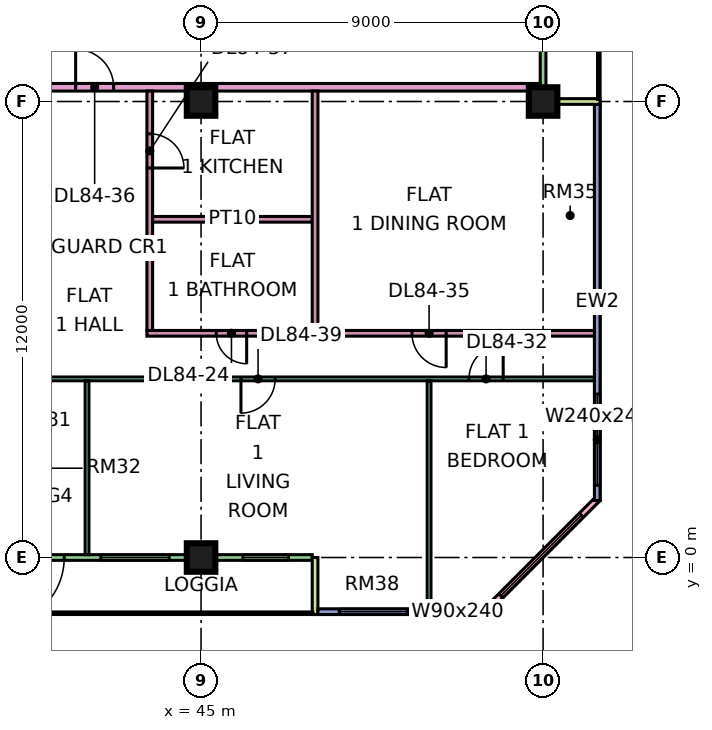
"""IFC4 building model, lengths in metres.
Left out: names, types, materials, properties, quantities, classifications, styles, units other than length and angle.
Written with IfcOpenShell. Run it as: python <this file> out.ifc"""

import sys

from ifc_helpers import new_model, si_unit, direction, frame, frame_2d, origin, origin_2d, place, context, subcontext, project, spatial, rectangle, extrude, element, fill, save


model = new_model("IFC4")
c1 = context("Model", 3, precision=1e-05, world=origin(), true_north=direction((0.0, 1.0)))
c2 = subcontext(c1, "Body", "Model", "MODEL_VIEW")
j1 = project(units=[si_unit("LENGTHUNIT", "METRE"), si_unit("PLANEANGLEUNIT", "RADIAN")], contexts=[c1])
p1 = place(None, origin())
s1 = spatial("IfcSite", under=j1, at=p1, CompositionType="ELEMENT")
p2 = place(p1, origin())
s2 = spatial("IfcBuilding", under=s1, at=p2, CompositionType="ELEMENT")
p3 = place(p2, frame((0.0, 0.0, 361.4)))
s3 = spatial("IfcBuildingStorey", under=s2, at=p3, CompositionType="ELEMENT", Elevation=361.4)
for number, where, z_axis, x_axis in (
    (1, (45.0, 0.0, 0.0), (0.0, 0.0, 1.0), (1.0, 0.0, 0.0)),
    (2, (45.0, 12.0, 0.0), (0.0, 0.0, 1.0), (1.0, 0.0, 0.0)),
    (3, (54.0, 12.0, 0.0), (0.0, 0.0, 1.0), (1.0, 0.0, 0.0)),
):
    element("IfcColumn", number, at=place(p3, frame(where, z_axis=z_axis, x_axis=x_axis)), inside=s3, PredefinedType="COLUMN", context=c2, shape_type="SweptSolid", body=[
        extrude(rectangle(XDim=0.75, YDim=0.75, at=origin_2d()), origin(), (0.0, 0.0, 1.0), 3.75),
    ])
p4 = place(p3, frame((36.075, 0.0, 0.0), z_axis=(0.0, 0.0, 1.0), x_axis=(1.0, 0.0, 0.0)))
e4 = element("IfcWall", 4, at=p4, inside=s3, PredefinedType="SOLIDWALL", context=c2, shape_type="SweptSolid", body=[
    extrude(rectangle(XDim=11.85, YDim=0.15, at=frame_2d((5.925, 0.0))), origin(), (0.0, 0.0, 1.0), 3.35),
])
p5 = place(p4, frame((0.762, 0.0, 0.45)))
e5 = element("IfcOpeningElement", 5, at=p5, cuts=e4, PredefinedType="OPENING", context=c2, shape_type="SweptSolid", body=[
    extrude(rectangle(XDim=1.8, YDim=2.4, at=frame_2d((0.9, 1.2))), frame((0.0, 0.085, 0.0), z_axis=(0.0, -1.0, 0.0), x_axis=(1.0, 0.0, 0.0)), (0.0, 0.0, 1.0), 0.17),
])
p6 = place(p4, frame((3.525, 0.0, 0.0)))
e6 = element("IfcOpeningElement", 6, at=p6, cuts=e4, PredefinedType="OPENING", context=c2, shape_type="SweptSolid", body=[
    extrude(rectangle(XDim=1.8, YDim=2.4, at=frame_2d((0.9, 1.2))), frame((0.0, 0.085, 0.0), z_axis=(0.0, -1.0, 0.0), x_axis=(1.0, 0.0, 0.0)), (0.0, 0.0, 1.0), 0.17),
])
p7 = place(p4, frame((6.288, 0.0, 0.45)))
e7 = element("IfcOpeningElement", 7, at=p7, cuts=e4, PredefinedType="OPENING", context=c2, shape_type="SweptSolid", body=[
    extrude(rectangle(XDim=1.8, YDim=2.4, at=frame_2d((0.9, 1.2))), frame((0.0, 0.085, 0.0), z_axis=(0.0, -1.0, 0.0), x_axis=(1.0, 0.0, 0.0)), (0.0, 0.0, 1.0), 0.17),
])
p8 = place(p4, frame((10.025, 0.0, 0.45)))
e8 = element("IfcOpeningElement", 8, at=p8, cuts=e4, PredefinedType="OPENING", context=c2, shape_type="SweptSolid", body=[
    extrude(rectangle(XDim=1.2, YDim=2.4, at=frame_2d((0.6, 1.2))), frame((0.0, 0.085, 0.0), z_axis=(0.0, -1.0, 0.0), x_axis=(1.0, 0.0, 0.0)), (0.0, 0.0, 1.0), 0.17),
])
p9 = place(p3, frame((48.0, -1.5, 0.0), z_axis=(0.0, 0.0, 1.0), x_axis=(0.0, 1.0, 0.0)))
e9 = element("IfcWall", 9, at=p9, inside=s3, PredefinedType="SOLIDWALL", context=c2, shape_type="SweptSolid", body=[
    extrude(rectangle(XDim=1.5, YDim=0.15, at=frame_2d((0.75, 0.0))), origin(), (0.0, 0.0, 1.0), 3.35),
])
p10 = place(p3, frame((48.075, -1.425, 0.0), z_axis=(0.0, 0.0, 1.0), x_axis=(1.0, 0.0, 0.0)))
e10 = element("IfcWall", 10, at=p10, inside=s3, PredefinedType="SOLIDWALL", context=c2, shape_type="SweptSolid", body=[
    extrude(rectangle(XDim=4.425, YDim=0.15, at=frame_2d((2.212, 0.0))), origin(), (0.0, 0.0, 1.0), 3.35),
])
p11 = place(p10, frame((0.562, 0.0, 0.45)))
e11 = element("IfcOpeningElement", 11, at=p11, cuts=e10, PredefinedType="OPENING", context=c2, shape_type="SweptSolid", body=[
    extrude(rectangle(XDim=1.8, YDim=2.4, at=frame_2d((0.9, 1.2))), frame((0.0, 0.085, 0.0), z_axis=(0.0, -1.0, 0.0), x_axis=(1.0, 0.0, 0.0)), (0.0, 0.0, 1.0), 0.17),
])
p12 = place(p10, frame((3.225, 0.0, 0.45)))
e12 = element("IfcOpeningElement", 12, at=p12, cuts=e10, PredefinedType="OPENING", context=c2, shape_type="SweptSolid", body=[
    extrude(rectangle(XDim=0.9, YDim=2.4, at=frame_2d((0.45, 1.2))), frame((0.0, 0.085, 0.0), z_axis=(0.0, -1.0, 0.0), x_axis=(1.0, 0.0, 0.0)), (0.0, 0.0, 1.0), 0.17),
])
p13 = place(p3, frame((52.447, -1.447, 0.0), z_axis=(0.0, 0.0, 1.0), x_axis=(0.707106781187, 0.707106781187, 0.0)))
e13 = element("IfcWall", 13, at=p13, inside=s3, PredefinedType="SOLIDWALL", context=c2, shape_type="SweptSolid", body=[
    extrude(rectangle(XDim=4.243, YDim=0.15, at=frame_2d((2.121, 0.0))), origin(), (0.0, 0.0, 1.0), 3.35),
])
p14 = place(p13, frame((0.621, 0.0, 0.45)))
e14 = element("IfcOpeningElement", 14, at=p14, cuts=e13, PredefinedType="OPENING", context=c2, shape_type="SweptSolid", body=[
    extrude(rectangle(XDim=3.0, YDim=2.4, at=frame_2d((1.5, 1.2))), frame((0.0, 0.085, 0.0), z_axis=(0.0, -1.0, 0.0), x_axis=(1.0, 0.0, 0.0)), (0.0, 0.0, 1.0), 0.17),
])
p15 = place(p3, frame((55.425, 1.5, 0.0), z_axis=(0.0, 0.0, 1.0), x_axis=(0.0, 1.0, 0.0)))
e15 = element("IfcWall", 15, at=p15, inside=s3, PredefinedType="SOLIDWALL", context=c2, shape_type="SweptSolid", body=[
    extrude(rectangle(XDim=10.425, YDim=0.15, at=frame_2d((5.212, 0.0))), origin(), (0.0, 0.0, 1.0), 3.35),
])
p16 = place(p15, frame((0.4, 0.0, 0.45)))
e16 = element("IfcOpeningElement", 16, at=p16, cuts=e15, PredefinedType="OPENING", context=c2, shape_type="SweptSolid", body=[
    extrude(rectangle(XDim=2.4, YDim=2.4, at=frame_2d((1.2, 1.2))), frame((0.0, 0.085, 0.0), z_axis=(0.0, -1.0, 0.0), x_axis=(1.0, 0.0, 0.0)), (0.0, 0.0, 1.0), 0.17),
])
p17 = place(p3, frame((54.0, 12.075, 0.0), z_axis=(0.0, 0.0, 1.0), x_axis=(0.0, 1.0, 0.0)))
e17 = element("IfcWall", 17, at=p17, inside=s3, PredefinedType="SOLIDWALL", context=c2, shape_type="SweptSolid", body=[
    extrude(rectangle(XDim=10.35, YDim=0.15, at=frame_2d((5.175, 0.0))), origin(), (0.0, 0.0, 1.0), 3.35),
])
p18 = place(p17, frame((4.538, 0.0, 0.45)))
e18 = element("IfcOpeningElement", 18, at=p18, cuts=e17, PredefinedType="OPENING", context=c2, shape_type="SweptSolid", body=[
    extrude(rectangle(XDim=4.8, YDim=2.4, at=frame_2d((2.4, 1.2))), frame((0.0, 0.085, 0.0), z_axis=(0.0, -1.0, 0.0), x_axis=(1.0, 0.0, 0.0)), (0.0, 0.0, 1.0), 0.17),
])
p19 = place(p3, frame((55.5, 12.0, 0.0), z_axis=(0.0, 0.0, 1.0), x_axis=(-1.0, 0.0, 0.0)))
e19 = element("IfcWall", 19, at=p19, inside=s3, PredefinedType="SOLIDWALL", context=c2, shape_type="SweptSolid", body=[
    extrude(rectangle(XDim=1.5, YDim=0.15, at=frame_2d((0.75, 0.0))), origin(), (0.0, 0.0, 1.0), 3.35),
])
p20 = place(p3, frame((33.05, 4.7, 0.0), z_axis=(0.0, 0.0, 1.0), x_axis=(1.0, 0.0, 0.0)))
e20 = element("IfcWall", 20, at=p20, inside=s3, PredefinedType="PARTITIONING", context=c2, shape_type="SweptSolid", body=[
    extrude(rectangle(XDim=22.301, YDim=0.1, at=frame_2d((11.15, 0.0))), origin(), (0.0, 0.0, 1.0), 3.35),
])
p21 = place(p20, frame((1.0, 0.0, 0.0)))
e21 = element("IfcOpeningElement", 21, at=p21, cuts=e20, PredefinedType="OPENING", context=c2, shape_type="SweptSolid", body=[
    extrude(rectangle(XDim=0.9, YDim=2.1, at=frame_2d((0.45, 1.05))), frame((0.0, 0.06, 0.0), z_axis=(0.0, -1.0, 0.0), x_axis=(1.0, 0.0, 0.0)), (0.0, 0.0, 1.0), 0.12),
])
p22 = place(p20, frame((4.0, 0.0, 0.0)))
e22 = element("IfcOpeningElement", 22, at=p22, cuts=e20, PredefinedType="OPENING", context=c2, shape_type="SweptSolid", body=[
    extrude(rectangle(XDim=0.9, YDim=2.1, at=frame_2d((0.45, 1.05))), frame((0.0, 0.06, 0.0), z_axis=(0.0, -1.0, 0.0), x_axis=(1.0, 0.0, 0.0)), (0.0, 0.0, 1.0), 0.12),
])
p23 = place(p20, frame((7.0, 0.0, 0.0)))
e23 = element("IfcOpeningElement", 23, at=p23, cuts=e20, PredefinedType="OPENING", context=c2, shape_type="SweptSolid", body=[
    extrude(rectangle(XDim=0.9, YDim=2.1, at=frame_2d((0.45, 1.05))), frame((0.0, 0.06, 0.0), z_axis=(0.0, -1.0, 0.0), x_axis=(1.0, 0.0, 0.0)), (0.0, 0.0, 1.0), 0.12),
])
p24 = place(p20, frame((19.0, 0.0, 0.0)))
e24 = element("IfcOpeningElement", 24, at=p24, cuts=e20, PredefinedType="OPENING", context=c2, shape_type="SweptSolid", body=[
    extrude(rectangle(XDim=0.9, YDim=2.1, at=frame_2d((0.45, 1.05))), frame((0.0, 0.06, 0.0), z_axis=(0.0, -1.0, 0.0), x_axis=(1.0, 0.0, 0.0)), (0.0, 0.0, 1.0), 0.12),
])
p25 = place(p20, frame((13.0, 0.0, 0.0)))
e25 = element("IfcOpeningElement", 25, at=p25, cuts=e20, PredefinedType="OPENING", context=c2, shape_type="SweptSolid", body=[
    extrude(rectangle(XDim=0.9, YDim=2.1, at=frame_2d((0.45, 1.05))), frame((0.0, 0.06, 0.0), z_axis=(0.0, -1.0, 0.0), x_axis=(1.0, 0.0, 0.0)), (0.0, 0.0, 1.0), 0.12),
])
p26 = place(p3, frame((40.65, 12.375, 0.0), z_axis=(0.0, 0.0, 1.0), x_axis=(1.0, 0.0, 0.0)))
e26 = element("IfcWall", 26, at=p26, inside=s3, PredefinedType="PARTITIONING", context=c2, shape_type="SweptSolid", body=[
    extrude(rectangle(XDim=13.276, YDim=0.2, at=frame_2d((6.638, 0.0))), origin(), (0.0, 0.0, 1.0), 3.35),
])
p27 = place(p26, frame((1.05, 0.0, 0.0)))
e27 = element("IfcOpeningElement", 27, at=p27, cuts=e26, PredefinedType="OPENING", context=c2, shape_type="SweptSolid", body=[
    extrude(rectangle(XDim=1.0, YDim=2.1, at=frame_2d((0.5, 1.05))), frame((0.0, 0.11, 0.0), z_axis=(0.0, -1.0, 0.0), x_axis=(1.0, 0.0, 0.0)), (0.0, 0.0, 1.0), 0.22),
])
p28 = place(p3, frame((42.0, 0.074, 0.0), z_axis=(0.0, 0.0, 1.0), x_axis=(0.0, 1.0, 0.0)))
e28 = element("IfcWall", 28, at=p28, inside=s3, PredefinedType="PARTITIONING", context=c2, shape_type="SweptSolid", body=[
    extrude(rectangle(XDim=4.576, YDim=0.1, at=frame_2d((2.288, 0.0))), origin(), (0.0, 0.0, 1.0), 3.35),
])
p29 = place(p3, frame((43.575, 5.9, 0.0), z_axis=(0.0, 0.0, 1.0), x_axis=(1.0, 0.0, 0.0)))
e29 = element("IfcWall", 29, at=p29, inside=s3, PredefinedType="PARTITIONING", context=c2, shape_type="SweptSolid", body=[
    extrude(rectangle(XDim=11.775, YDim=0.15, at=frame_2d((5.888, 0.0))), origin(), (0.0, 0.0, 1.0), 3.35),
])
p30 = place(p29, frame((1.825, 0.0, 0.0)))
e30 = element("IfcOpeningElement", 30, at=p30, cuts=e29, PredefinedType="OPENING", context=c2, shape_type="SweptSolid", body=[
    extrude(rectangle(XDim=0.8, YDim=2.1, at=frame_2d((0.4, 1.05))), frame((0.0, 0.085, 0.0), z_axis=(0.0, -1.0, 0.0), x_axis=(1.0, 0.0, 0.0)), (0.0, 0.0, 1.0), 0.17),
])
p31 = place(p29, frame((6.975, 0.0, 0.0)))
e31 = element("IfcOpeningElement", 31, at=p31, cuts=e29, PredefinedType="OPENING", context=c2, shape_type="SweptSolid", body=[
    extrude(rectangle(XDim=0.9, YDim=2.1, at=frame_2d((0.45, 1.05))), frame((0.0, 0.085, 0.0), z_axis=(0.0, -1.0, 0.0), x_axis=(1.0, 0.0, 0.0)), (0.0, 0.0, 1.0), 0.17),
])
p32 = place(p3, frame((43.65, 5.975, 0.0), z_axis=(0.0, 0.0, 1.0), x_axis=(0.0, 1.0, 0.0)))
e32 = element("IfcWall", 32, at=p32, inside=s3, PredefinedType="PARTITIONING", context=c2, shape_type="SweptSolid", body=[
    extrude(rectangle(XDim=6.3, YDim=0.15, at=frame_2d((3.15, 0.0))), origin(), (0.0, 0.0, 1.0), 3.35),
])
p33 = place(p32, frame((4.275, 0.0, 0.0)))
e33 = element("IfcOpeningElement", 33, at=p33, cuts=e32, PredefinedType="OPENING", context=c2, shape_type="SweptSolid", body=[
    extrude(rectangle(XDim=0.9, YDim=2.1, at=frame_2d((0.45, 1.05))), frame((0.0, 0.085, 0.0), z_axis=(0.0, -1.0, 0.0), x_axis=(1.0, 0.0, 0.0)), (0.0, 0.0, 1.0), 0.17),
])
p34 = place(p3, frame((43.725, 8.9, 0.0), z_axis=(0.0, 0.0, 1.0), x_axis=(1.0, 0.0, 0.0)))
e34 = element("IfcWall", 34, at=p34, inside=s3, PredefinedType="PARTITIONING", context=c2, shape_type="SweptSolid", body=[
    extrude(rectangle(XDim=4.2, YDim=0.15, at=frame_2d((2.1, 0.0))), origin(), (0.0, 0.0, 1.0), 3.35),
])
p35 = place(p3, frame((48.0, 5.975, 0.0), z_axis=(0.0, 0.0, 1.0), x_axis=(0.0, 1.0, 0.0)))
e35 = element("IfcWall", 35, at=p35, inside=s3, PredefinedType="PARTITIONING", context=c2, shape_type="SweptSolid", body=[
    extrude(rectangle(XDim=6.3, YDim=0.15, at=frame_2d((3.15, 0.0))), origin(), (0.0, 0.0, 1.0), 3.35),
])
p36 = place(p3, frame((51.0, -1.35, 0.0), z_axis=(0.0, 0.0, 1.0), x_axis=(0.0, 1.0, 0.0)))
e36 = element("IfcWall", 36, at=p36, inside=s3, PredefinedType="PARTITIONING", context=c2, shape_type="SweptSolid", body=[
    extrude(rectangle(XDim=6.0, YDim=0.1, at=frame_2d((3.0, 0.0))), origin(), (0.0, 0.0, 1.0), 3.35),
])
p37 = place(p6, frame((1.8, 0.0, 0.0), z_axis=(0.0, 0.0, 1.0), x_axis=(-1.0, 0.0, 0.0)))
e37 = element("IfcDoor", 37, at=p37, inside=s3, OperationType="DOUBLE_DOOR_SINGLE_SWING", PredefinedType="DOOR", context=c2, shape_type="SweptSolid", body=[
    extrude(rectangle(XDim=1.8, YDim=2.4, at=frame_2d((0.9, 1.2))), frame((0.0, 0.025, 0.0), z_axis=(0.0, -1.0, 0.0), x_axis=(1.0, 0.0, 0.0)), (0.0, 0.0, 1.0), 0.05),
])
fill(e6, e37)
p38 = place(p7, origin())
e38 = element("IfcWindow", 38, at=p38, inside=s3, PartitioningType="SINGLE_PANEL", PredefinedType="WINDOW", context=c2, shape_type="SweptSolid", body=[
    extrude(rectangle(XDim=1.8, YDim=2.4, at=frame_2d((0.9, 1.2))), frame((0.0, 0.03, 0.0), z_axis=(0.0, -1.0, 0.0), x_axis=(1.0, 0.0, 0.0)), (0.0, 0.0, 1.0), 0.06),
])
fill(e7, e38)
p39 = place(p8, origin())
e39 = element("IfcWindow", 39, at=p39, inside=s3, PartitioningType="SINGLE_PANEL", PredefinedType="WINDOW", context=c2, shape_type="SweptSolid", body=[
    extrude(rectangle(XDim=1.2, YDim=2.4, at=frame_2d((0.6, 1.2))), frame((0.0, 0.03, 0.0), z_axis=(0.0, -1.0, 0.0), x_axis=(1.0, 0.0, 0.0)), (0.0, 0.0, 1.0), 0.06),
])
fill(e8, e39)
p40 = place(p11, origin())
e40 = element("IfcWindow", 40, at=p40, inside=s3, PartitioningType="SINGLE_PANEL", PredefinedType="WINDOW", context=c2, shape_type="SweptSolid", body=[
    extrude(rectangle(XDim=1.8, YDim=2.4, at=frame_2d((0.9, 1.2))), frame((0.0, 0.03, 0.0), z_axis=(0.0, -1.0, 0.0), x_axis=(1.0, 0.0, 0.0)), (0.0, 0.0, 1.0), 0.06),
])
fill(e11, e40)
p41 = place(p12, origin())
e41 = element("IfcWindow", 41, at=p41, inside=s3, PartitioningType="SINGLE_PANEL", PredefinedType="WINDOW", context=c2, shape_type="SweptSolid", body=[
    extrude(rectangle(XDim=0.9, YDim=2.4, at=frame_2d((0.45, 1.2))), frame((0.0, 0.03, 0.0), z_axis=(0.0, -1.0, 0.0), x_axis=(1.0, 0.0, 0.0)), (0.0, 0.0, 1.0), 0.06),
])
fill(e12, e41)
p42 = place(p14, origin())
e42 = element("IfcWindow", 42, at=p42, inside=s3, PartitioningType="SINGLE_PANEL", PredefinedType="WINDOW", context=c2, shape_type="SweptSolid", body=[
    extrude(rectangle(XDim=3.0, YDim=2.4, at=frame_2d((1.5, 1.2))), frame((0.0, 0.03, 0.0), z_axis=(0.0, -1.0, 0.0), x_axis=(1.0, 0.0, 0.0)), (0.0, 0.0, 1.0), 0.06),
])
fill(e14, e42)
p43 = place(p16, origin())
e43 = element("IfcWindow", 43, at=p43, inside=s3, PartitioningType="SINGLE_PANEL", PredefinedType="WINDOW", context=c2, shape_type="SweptSolid", body=[
    extrude(rectangle(XDim=2.4, YDim=2.4, at=frame_2d((1.2, 1.2))), frame((0.0, 0.03, 0.0), z_axis=(0.0, -1.0, 0.0), x_axis=(1.0, 0.0, 0.0)), (0.0, 0.0, 1.0), 0.06),
])
fill(e16, e43)
p44 = place(p30, origin())
e44 = element("IfcDoor", 44, at=p44, inside=s3, OperationType="SINGLE_SWING_RIGHT", PredefinedType="DOOR", context=c2, shape_type="SweptSolid", body=[
    extrude(rectangle(XDim=0.8, YDim=2.1, at=frame_2d((0.4, 1.05))), frame((0.0, 0.025, 0.0), z_axis=(0.0, -1.0, 0.0), x_axis=(1.0, 0.0, 0.0)), (0.0, 0.0, 1.0), 0.05),
])
fill(e30, e44)
p45 = place(p24, frame((0.9, 0.0, 0.0), z_axis=(0.0, 0.0, 1.0), x_axis=(-1.0, 0.0, 0.0)))
e45 = element("IfcDoor", 45, at=p45, inside=s3, OperationType="SINGLE_SWING_RIGHT", PredefinedType="DOOR", context=c2, shape_type="SweptSolid", body=[
    extrude(rectangle(XDim=0.9, YDim=2.1, at=frame_2d((0.45, 1.05))), frame((0.0, 0.025, 0.0), z_axis=(0.0, -1.0, 0.0), x_axis=(1.0, 0.0, 0.0)), (0.0, 0.0, 1.0), 0.05),
])
fill(e24, e45)
p46 = place(p31, origin())
e46 = element("IfcDoor", 46, at=p46, inside=s3, OperationType="SINGLE_SWING_RIGHT", PredefinedType="DOOR", context=c2, shape_type="SweptSolid", body=[
    extrude(rectangle(XDim=0.9, YDim=2.1, at=frame_2d((0.45, 1.05))), frame((0.0, 0.025, 0.0), z_axis=(0.0, -1.0, 0.0), x_axis=(1.0, 0.0, 0.0)), (0.0, 0.0, 1.0), 0.05),
])
fill(e31, e46)
p47 = place(p27, origin())
e47 = element("IfcDoor", 47, at=p47, inside=s3, OperationType="SINGLE_SWING_LEFT", PredefinedType="DOOR", context=c2, shape_type="SweptSolid", body=[
    extrude(rectangle(XDim=1.0, YDim=2.1, at=frame_2d((0.5, 1.05))), frame((0.0, 0.025, 0.0), z_axis=(0.0, -1.0, 0.0), x_axis=(1.0, 0.0, 0.0)), (0.0, 0.0, 1.0), 0.05),
])
fill(e27, e47)
p48 = place(p33, frame((0.9, 0.0, 0.0), z_axis=(0.0, 0.0, 1.0), x_axis=(-1.0, 0.0, 0.0)))
e48 = element("IfcDoor", 48, at=p48, inside=s3, OperationType="SINGLE_SWING_LEFT", PredefinedType="DOOR", context=c2, shape_type="SweptSolid", body=[
    extrude(rectangle(XDim=0.9, YDim=2.1, at=frame_2d((0.45, 1.05))), frame((0.0, 0.025, 0.0), z_axis=(0.0, -1.0, 0.0), x_axis=(1.0, 0.0, 0.0)), (0.0, 0.0, 1.0), 0.05),
])
fill(e33, e48)
p49 = place(p25, frame((0.9, 0.0, 0.0), z_axis=(0.0, 0.0, 1.0), x_axis=(-1.0, 0.0, 0.0)))
e49 = element("IfcDoor", 49, at=p49, inside=s3, OperationType="SINGLE_SWING_LEFT", PredefinedType="DOOR", context=c2, shape_type="SweptSolid", body=[
    extrude(rectangle(XDim=0.9, YDim=2.1, at=frame_2d((0.45, 1.05))), frame((0.0, 0.025, 0.0), z_axis=(0.0, -1.0, 0.0), x_axis=(1.0, 0.0, 0.0)), (0.0, 0.0, 1.0), 0.05),
])
fill(e25, e49)
save(model, sys.argv[1])
